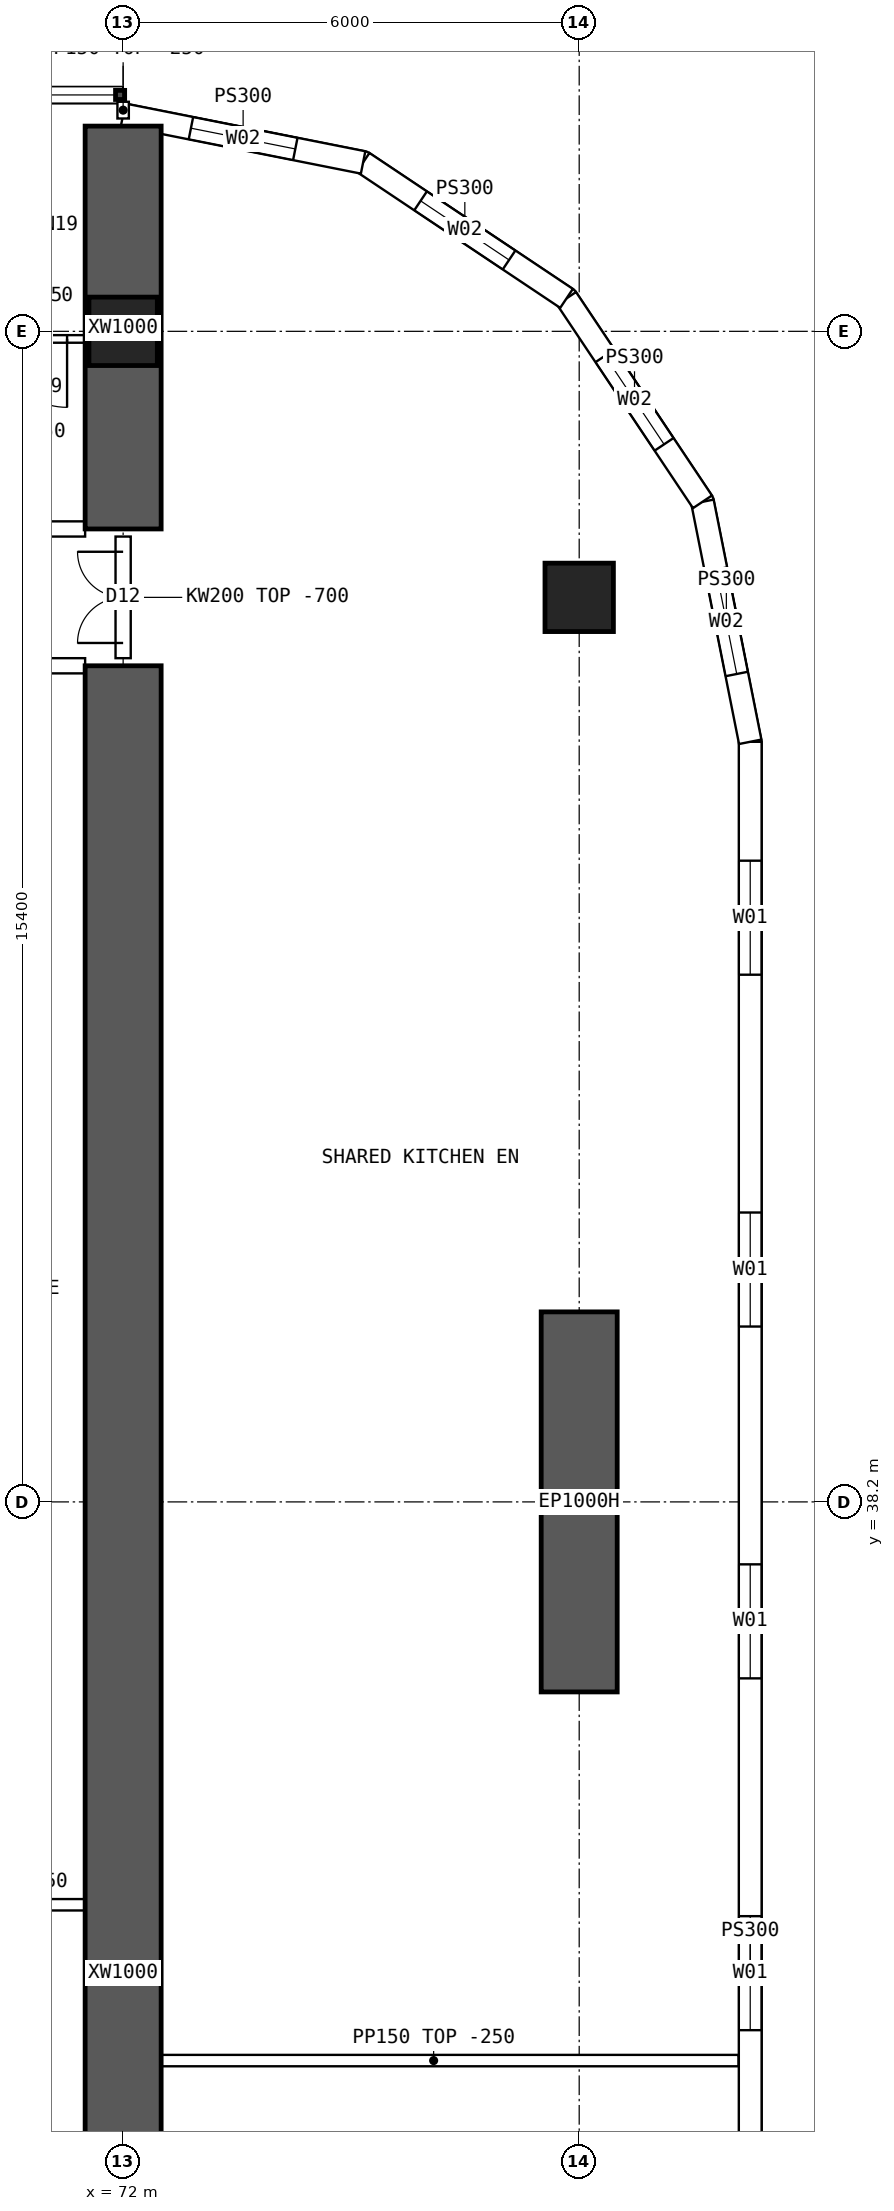
"""IFC4 building model, lengths in metres.
Left out: names, types, materials, properties, quantities, classifications, styles, units other than length and angle.
Written with IfcOpenShell. Run it as: python <this file> out.ifc"""

import sys

from ifc_helpers import new_model, si_unit, direction, frame, frame_2d, origin, origin_2d, place, context, subcontext, project, spatial, polyline, rectangle, hollow_rectangle, outline, extrude, element, fill, save


model = new_model("IFC4")
c1 = context("Model", 3, precision=1e-05, world=origin(), true_north=direction((0.0, 1.0)))
c2 = subcontext(c1, "Body", "Model", "MODEL_VIEW")
j1 = project(units=[si_unit("LENGTHUNIT", "METRE"), si_unit("PLANEANGLEUNIT", "RADIAN")], contexts=[c1])
p1 = place(None, origin())
s1 = spatial("IfcSite", under=j1, at=p1, CompositionType="ELEMENT")
p2 = place(p1, origin())
s2 = spatial("IfcBuilding", under=s1, at=p2, CompositionType="ELEMENT")
p3 = place(p2, frame((0.0, 0.0, 23.95)))
s3 = spatial("IfcBuildingStorey", under=s2, at=p3, CompositionType="ELEMENT", Elevation=23.95)
for number, where, z_axis, x_axis in (
    (1, (72.0, 53.6, 0.0), (0.0, 0.0, 1.0), (1.0, 0.0, 0.0)),
    (2, (78.0, 50.1, 0.0), (0.0, 0.0, 1.0), (1.0, 0.0, 0.0)),
):
    element("IfcColumn", number, at=place(p3, frame(where, z_axis=z_axis, x_axis=x_axis)), inside=s3, PredefinedType="COLUMN", context=c2, shape_type="SweptSolid", body=[
        extrude(hollow_rectangle(XDim=0.9, YDim=0.9, WallThickness=0.09, at=origin_2d()), origin(), (0.0, 0.0, 1.0), 3.75),
    ])
p4 = place(p3, frame((78.0, 35.7, 0.0), z_axis=(0.0, 0.0, 1.0), x_axis=(0.0, 1.0, 0.0)))
e3 = element("IfcWall", 3, at=p4, inside=s3, PredefinedType="SHEAR", context=c2, shape_type="SweptSolid", body=[
    extrude(rectangle(XDim=5.0, YDim=1.0, at=frame_2d((2.5, 0.0))), origin(), (0.0, 0.0, 1.0), 3.75),
])
p5 = place(p3, frame((72.0, 51.0, 0.0), z_axis=(0.0, 0.0, 1.0), x_axis=(0.0, 1.0, 0.0)))
e4 = element("IfcWall", 4, at=p5, inside=s3, PredefinedType="SHEAR", context=c2, shape_type="SweptSolid", body=[
    extrude(rectangle(XDim=5.3, YDim=1.0, at=frame_2d((2.65, 0.0))), origin(), (0.0, 0.0, 1.0), 3.75),
])
p6 = place(p3, frame((72.0, 14.8, 0.0), z_axis=(0.0, 0.0, 1.0), x_axis=(0.0, 1.0, 0.0)))
e5 = element("IfcWall", 5, at=p6, inside=s3, PredefinedType="SHEAR", context=c2, shape_type="SweptSolid", body=[
    extrude(rectangle(XDim=34.4, YDim=1.0, at=frame_2d((17.2, 0.0))), origin(), (0.0, 0.0, 1.0), 3.75),
])
p7 = place(p3, frame((80.25, 15.8, 0.0), z_axis=(0.0, 0.0, 1.0), x_axis=(0.0, 1.0, 0.0)))
e6 = element("IfcWall", 6, at=p7, inside=s3, PredefinedType="SOLIDWALL", context=c2, shape_type="SweptSolid", body=[
    extrude(outline(polyline([(-0.015, -0.15), (32.415, -0.15), (32.385, 0.15), (0.015, 0.15), (-0.015, -0.15)])), origin(), (0.0, 0.0, 1.0), 3.5),
])
p8 = place(p7, frame((1.564, 0.0, 0.9)))
e7 = element("IfcOpeningElement", 7, at=p8, cuts=e6, PredefinedType="OPENING", context=c2, shape_type="SweptSolid", body=[
    extrude(rectangle(XDim=1.5, YDim=2.0, at=frame_2d((0.75, 1.0))), frame((0.0, 0.16, 0.0), z_axis=(0.0, -1.0, 0.0), x_axis=(1.0, 0.0, 0.0)), (0.0, 0.0, 1.0), 0.32),
])
p9 = place(p7, frame((6.193, 0.0, 0.9)))
e8 = element("IfcOpeningElement", 8, at=p9, cuts=e6, PredefinedType="OPENING", context=c2, shape_type="SweptSolid", body=[
    extrude(rectangle(XDim=1.5, YDim=2.0, at=frame_2d((0.75, 1.0))), frame((0.0, 0.16, 0.0), z_axis=(0.0, -1.0, 0.0), x_axis=(1.0, 0.0, 0.0)), (0.0, 0.0, 1.0), 0.32),
])
p10 = place(p7, frame((10.822, 0.0, 0.9)))
e9 = element("IfcOpeningElement", 9, at=p10, cuts=e6, PredefinedType="OPENING", context=c2, shape_type="SweptSolid", body=[
    extrude(rectangle(XDim=1.5, YDim=2.0, at=frame_2d((0.75, 1.0))), frame((0.0, 0.16, 0.0), z_axis=(0.0, -1.0, 0.0), x_axis=(1.0, 0.0, 0.0)), (0.0, 0.0, 1.0), 0.32),
])
p11 = place(p7, frame((15.45, 0.0, 0.9)))
e10 = element("IfcOpeningElement", 10, at=p11, cuts=e6, PredefinedType="OPENING", context=c2, shape_type="SweptSolid", body=[
    extrude(rectangle(XDim=1.5, YDim=2.0, at=frame_2d((0.75, 1.0))), frame((0.0, 0.16, 0.0), z_axis=(0.0, -1.0, 0.0), x_axis=(1.0, 0.0, 0.0)), (0.0, 0.0, 1.0), 0.32),
])
p12 = place(p7, frame((20.079, 0.0, 0.9)))
e11 = element("IfcOpeningElement", 11, at=p12, cuts=e6, PredefinedType="OPENING", context=c2, shape_type="SweptSolid", body=[
    extrude(rectangle(XDim=1.5, YDim=2.0, at=frame_2d((0.75, 1.0))), frame((0.0, 0.16, 0.0), z_axis=(0.0, -1.0, 0.0), x_axis=(1.0, 0.0, 0.0)), (0.0, 0.0, 1.0), 0.32),
])
p13 = place(p7, frame((24.707, 0.0, 0.9)))
e12 = element("IfcOpeningElement", 12, at=p13, cuts=e6, PredefinedType="OPENING", context=c2, shape_type="SweptSolid", body=[
    extrude(rectangle(XDim=1.5, YDim=2.0, at=frame_2d((0.75, 1.0))), frame((0.0, 0.16, 0.0), z_axis=(0.0, -1.0, 0.0), x_axis=(1.0, 0.0, 0.0)), (0.0, 0.0, 1.0), 0.32),
])
p14 = place(p7, frame((29.336, 0.0, 0.9)))
e13 = element("IfcOpeningElement", 13, at=p14, cuts=e6, PredefinedType="OPENING", context=c2, shape_type="SweptSolid", body=[
    extrude(rectangle(XDim=1.5, YDim=2.0, at=frame_2d((0.75, 1.0))), frame((0.0, 0.16, 0.0), z_axis=(0.0, -1.0, 0.0), x_axis=(1.0, 0.0, 0.0)), (0.0, 0.0, 1.0), 0.32),
])
p15 = place(p3, frame((80.25, 48.2, 0.0), z_axis=(0.0, 0.0, 1.0), x_axis=(-0.195065901187, 0.980790137692, 0.0)))
e14 = element("IfcWall", 14, at=p15, inside=s3, PredefinedType="SOLIDWALL", context=c2, shape_type="SweptSolid", body=[
    extrude(outline(polyline([(-0.015, -0.15), (3.249, -0.15), (3.189, 0.15), (0.015, 0.15), (-0.015, -0.15)])), origin(), (0.0, 0.0, 1.0), 3.5),
])
p16 = place(p15, frame((0.909, 0.0, 0.9)))
e15 = element("IfcOpeningElement", 15, at=p16, cuts=e14, PredefinedType="OPENING", context=c2, shape_type="SweptSolid", body=[
    extrude(rectangle(XDim=1.4, YDim=1.8, at=frame_2d((0.7, 0.9))), frame((0.0, 0.16, 0.0), z_axis=(0.0, -1.0, 0.0), x_axis=(1.0, 0.0, 0.0)), (0.0, 0.0, 1.0), 0.32),
])
p17 = place(p3, frame((79.622, 51.357, 0.0), z_axis=(0.0, 0.0, 1.0), x_axis=(-0.555609954424, 0.831443069936, 0.0)))
e16 = element("IfcWall", 16, at=p17, inside=s3, PredefinedType="SOLIDWALL", context=c2, shape_type="SweptSolid", body=[
    extrude(outline(polyline([(-0.03, -0.15), (3.249, -0.15), (3.189, 0.15), (0.03, 0.15), (-0.03, -0.15)])), origin(), (0.0, 0.0, 1.0), 3.5),
])
p18 = place(p17, frame((0.909, 0.0, 0.9)))
e17 = element("IfcOpeningElement", 17, at=p18, cuts=e16, PredefinedType="OPENING", context=c2, shape_type="SweptSolid", body=[
    extrude(rectangle(XDim=1.4, YDim=1.8, at=frame_2d((0.7, 0.9))), frame((0.0, 0.16, 0.0), z_axis=(0.0, -1.0, 0.0), x_axis=(1.0, 0.0, 0.0)), (0.0, 0.0, 1.0), 0.32),
])
p19 = place(p3, frame((77.833, 54.034, 0.0), z_axis=(0.0, 0.0, 1.0), x_axis=(-0.831478105043, 0.555557522525, 0.0)))
e18 = element("IfcWall", 18, at=p19, inside=s3, PredefinedType="SOLIDWALL", context=c2, shape_type="SweptSolid", body=[
    extrude(outline(polyline([(-0.03, -0.15), (3.249, -0.15), (3.189, 0.15), (0.03, 0.15), (-0.03, -0.15)])), origin(), (0.0, 0.0, 1.0), 3.5),
])
p20 = place(p19, frame((0.909, 0.0, 0.9)))
e19 = element("IfcOpeningElement", 19, at=p20, cuts=e18, PredefinedType="OPENING", context=c2, shape_type="SweptSolid", body=[
    extrude(rectangle(XDim=1.4, YDim=1.8, at=frame_2d((0.7, 0.9))), frame((0.0, 0.16, 0.0), z_axis=(0.0, -1.0, 0.0), x_axis=(1.0, 0.0, 0.0)), (0.0, 0.0, 1.0), 0.32),
])
p21 = place(p3, frame((75.157, 55.822, 0.0), z_axis=(0.0, 0.0, 1.0), x_axis=(-0.980787251524, 0.195080412259, 0.0)))
e20 = element("IfcWall", 20, at=p21, inside=s3, PredefinedType="SOLIDWALL", context=c2, shape_type="SweptSolid", body=[
    extrude(outline(polyline([(-0.03, -0.15), (3.249, -0.15), (3.189, 0.15), (0.03, 0.15), (-0.03, -0.15)])), origin(), (0.0, 0.0, 1.0), 3.5),
])
p22 = place(p21, frame((0.909, 0.0, 0.9)))
e21 = element("IfcOpeningElement", 21, at=p22, cuts=e20, PredefinedType="OPENING", context=c2, shape_type="SweptSolid", body=[
    extrude(rectangle(XDim=1.4, YDim=1.8, at=frame_2d((0.7, 0.9))), frame((0.0, 0.16, 0.0), z_axis=(0.0, -1.0, 0.0), x_axis=(1.0, 0.0, 0.0)), (0.0, 0.0, 1.0), 0.32),
])
p23 = place(p3, frame((66.5, 51.0, 0.0), z_axis=(0.0, 0.0, 1.0), x_axis=(1.0, 0.0, 0.0)))
e22 = element("IfcWall", 22, at=p23, inside=s3, PredefinedType="SOLIDWALL", context=c2, shape_type="SweptSolid", body=[
    extrude(outline(polyline([(0.0, 0.0), (5.0, 0.0), (5.0, 3.1), (0.0, 3.1), (0.0, 0.0)])), frame((0.0, 0.1, 0.0), z_axis=(0.0, -1.0, 0.0), x_axis=(1.0, 0.0, 0.0)), (0.0, 0.0, 1.0), 0.2),
])
p24 = place(p23, frame((1.425, 0.0, 0.0)))
e23 = element("IfcOpeningElement", 23, at=p24, cuts=e22, PredefinedType="OPENING", context=c2, shape_type="SweptSolid", body=[
    extrude(rectangle(XDim=0.9, YDim=2.1, at=frame_2d((0.45, 1.05))), frame((0.0, 0.11, 0.0), z_axis=(0.0, -1.0, 0.0), x_axis=(1.0, 0.0, 0.0)), (0.0, 0.0, 1.0), 0.22),
])
p25 = place(p23, frame((2.675, 0.0, 0.0)))
e24 = element("IfcOpeningElement", 24, at=p25, cuts=e22, PredefinedType="OPENING", context=c2, shape_type="SweptSolid", body=[
    extrude(rectangle(XDim=0.9, YDim=2.1, at=frame_2d((0.45, 1.05))), frame((0.0, 0.11, 0.0), z_axis=(0.0, -1.0, 0.0), x_axis=(1.0, 0.0, 0.0)), (0.0, 0.0, 1.0), 0.22),
])
p26 = place(p3, frame((66.5, 49.2, 0.0), z_axis=(0.0, 0.0, 1.0), x_axis=(1.0, 0.0, 0.0)))
e25 = element("IfcWall", 25, at=p26, inside=s3, PredefinedType="SOLIDWALL", context=c2, shape_type="SweptSolid", body=[
    extrude(rectangle(XDim=5.0, YDim=0.2, at=frame_2d((2.5, 0.0))), origin(), (0.0, 0.0, 1.0), 3.5),
])
p27 = place(p26, frame((0.2, 0.0, 0.0)))
e26 = element("IfcOpeningElement", 26, at=p27, cuts=e25, PredefinedType="OPENING", context=c2, shape_type="SweptSolid", body=[
    extrude(rectangle(XDim=1.6, YDim=2.1, at=frame_2d((0.8, 1.05))), frame((0.0, 0.11, 0.0), z_axis=(0.0, -1.0, 0.0), x_axis=(1.0, 0.0, 0.0)), (0.0, 0.0, 1.0), 0.22),
])
p28 = place(p3, frame((70.125, 53.5, 0.0), z_axis=(0.0, 0.0, 1.0), x_axis=(1.0, 0.0, 0.0)))
e27 = element("IfcWall", 27, at=p28, inside=s3, PredefinedType="PARTITIONING", context=c2, shape_type="SweptSolid", body=[
    extrude(outline(polyline([(0.0, 0.0), (1.425, 0.0), (1.425, 3.1), (0.0, 3.1), (0.0, 0.0)])), frame((0.0, 0.05, 0.0), z_axis=(0.0, -1.0, 0.0), x_axis=(1.0, 0.0, 0.0)), (0.0, 0.0, 1.0), 0.1),
])
p29 = place(p28, frame((0.238, 0.0, 0.0)))
e28 = element("IfcOpeningElement", 28, at=p29, cuts=e27, PredefinedType="OPENING", context=c2, shape_type="SweptSolid", body=[
    extrude(rectangle(XDim=0.9, YDim=2.1, at=frame_2d((0.45, 1.05))), frame((0.0, 0.06, 0.0), z_axis=(0.0, -1.0, 0.0), x_axis=(1.0, 0.0, 0.0)), (0.0, 0.0, 1.0), 0.12),
])
p30 = place(p3, frame((68.4, 32.9, 0.0), z_axis=(0.0, 0.0, 1.0), x_axis=(1.0, 0.0, 0.0)))
e29 = element("IfcWall", 29, at=p30, inside=s3, PredefinedType="PARTITIONING", context=c2, shape_type="SweptSolid", body=[
    extrude(rectangle(XDim=3.6, YDim=0.15, at=frame_2d((1.8, 0.0))), origin(), (0.0, 0.0, 1.0), 3.5),
])
p31 = place(p3, frame((72.075, 30.85, 0.0), z_axis=(0.0, 0.0, 1.0), x_axis=(1.0, 0.0, 0.0)))
e30 = element("IfcWall", 30, at=p31, inside=s3, PredefinedType="PARTITIONING", context=c2, shape_type="SweptSolid", body=[
    extrude(outline(polyline([(0.0, 0.0), (8.02, 0.0), (8.02, 3.5), (6.227, 3.5), (6.225, 3.05), (5.627, 3.05), (5.625, 3.5), (0.0, 3.5), (0.0, 0.0)])), frame((0.0, 0.075, 0.0), z_axis=(0.0, -1.0, 0.0), x_axis=(1.0, 0.0, 0.0)), (0.0, 0.0, 1.0), 0.15),
])
p32 = place(p3, frame((72.0, 49.3, 0.0), z_axis=(0.0, 0.0, 1.0), x_axis=(0.0, 1.0, 0.0)))
e31 = element("IfcWall", 31, at=p32, inside=s3, PredefinedType="SOLIDWALL", context=c2, shape_type="SweptSolid", body=[
    extrude(outline(polyline([(0.0, 0.0), (1.6, 0.0), (1.6, 3.05), (0.0, 3.05), (0.0, 0.0)])), frame((0.0, 0.1, 0.0), z_axis=(0.0, -1.0, 0.0), x_axis=(1.0, 0.0, 0.0)), (0.0, 0.0, 1.0), 0.2),
])
p33 = place(p32, frame((0.2, 0.0, 0.0)))
e32 = element("IfcOpeningElement", 32, at=p33, cuts=e31, PredefinedType="OPENING", context=c2, shape_type="SweptSolid", body=[
    extrude(rectangle(XDim=1.2, YDim=2.1, at=frame_2d((0.6, 1.05))), frame((0.0, 0.11, 0.0), z_axis=(0.0, -1.0, 0.0), x_axis=(1.0, 0.0, 0.0)), (0.0, 0.0, 1.0), 0.22),
])
p34 = place(p3, frame((72.0, 56.4, 0.0), z_axis=(0.0, 0.0, 1.0), x_axis=(0.0, 1.0, 0.0)))
e33 = element("IfcWall", 33, at=p34, inside=s3, PredefinedType="PARTITIONING", context=c2, shape_type="SweptSolid", body=[
    extrude(rectangle(XDim=0.22, YDim=0.15, at=frame_2d((0.11, 0.0))), origin(), (0.0, 0.0, 1.0), 3.5),
])
p35 = place(p11, origin())
e34 = element("IfcWindow", 34, at=p35, inside=s3, PartitioningType="SINGLE_PANEL", PredefinedType="WINDOW", context=c2, shape_type="SweptSolid", body=[
    extrude(rectangle(XDim=1.5, YDim=2.0, at=frame_2d((0.75, 1.0))), frame((0.0, 0.03, 0.0), z_axis=(0.0, -1.0, 0.0), x_axis=(1.0, 0.0, 0.0)), (0.0, 0.0, 1.0), 0.06),
])
fill(e10, e34)
p36 = place(p12, origin())
e35 = element("IfcWindow", 35, at=p36, inside=s3, PartitioningType="SINGLE_PANEL", PredefinedType="WINDOW", context=c2, shape_type="SweptSolid", body=[
    extrude(rectangle(XDim=1.5, YDim=2.0, at=frame_2d((0.75, 1.0))), frame((0.0, 0.03, 0.0), z_axis=(0.0, -1.0, 0.0), x_axis=(1.0, 0.0, 0.0)), (0.0, 0.0, 1.0), 0.06),
])
fill(e11, e35)
p37 = place(p13, origin())
e36 = element("IfcWindow", 36, at=p37, inside=s3, PartitioningType="SINGLE_PANEL", PredefinedType="WINDOW", context=c2, shape_type="SweptSolid", body=[
    extrude(rectangle(XDim=1.5, YDim=2.0, at=frame_2d((0.75, 1.0))), frame((0.0, 0.03, 0.0), z_axis=(0.0, -1.0, 0.0), x_axis=(1.0, 0.0, 0.0)), (0.0, 0.0, 1.0), 0.06),
])
fill(e12, e36)
p38 = place(p14, origin())
e37 = element("IfcWindow", 37, at=p38, inside=s3, PartitioningType="SINGLE_PANEL", PredefinedType="WINDOW", context=c2, shape_type="SweptSolid", body=[
    extrude(rectangle(XDim=1.5, YDim=2.0, at=frame_2d((0.75, 1.0))), frame((0.0, 0.03, 0.0), z_axis=(0.0, -1.0, 0.0), x_axis=(1.0, 0.0, 0.0)), (0.0, 0.0, 1.0), 0.06),
])
fill(e13, e37)
p39 = place(p16, origin())
e38 = element("IfcWindow", 38, at=p39, inside=s3, PartitioningType="SINGLE_PANEL", PredefinedType="WINDOW", context=c2, shape_type="SweptSolid", body=[
    extrude(rectangle(XDim=1.4, YDim=1.8, at=frame_2d((0.7, 0.9))), frame((0.0, 0.03, 0.0), z_axis=(0.0, -1.0, 0.0), x_axis=(1.0, 0.0, 0.0)), (0.0, 0.0, 1.0), 0.06),
])
fill(e15, e38)
p40 = place(p18, origin())
e39 = element("IfcWindow", 39, at=p40, inside=s3, PartitioningType="SINGLE_PANEL", PredefinedType="WINDOW", context=c2, shape_type="SweptSolid", body=[
    extrude(rectangle(XDim=1.4, YDim=1.8, at=frame_2d((0.7, 0.9))), frame((0.0, 0.03, 0.0), z_axis=(0.0, -1.0, 0.0), x_axis=(1.0, 0.0, 0.0)), (0.0, 0.0, 1.0), 0.06),
])
fill(e17, e39)
p41 = place(p20, origin())
e40 = element("IfcWindow", 40, at=p41, inside=s3, PartitioningType="SINGLE_PANEL", PredefinedType="WINDOW", context=c2, shape_type="SweptSolid", body=[
    extrude(rectangle(XDim=1.4, YDim=1.8, at=frame_2d((0.7, 0.9))), frame((0.0, 0.03, 0.0), z_axis=(0.0, -1.0, 0.0), x_axis=(1.0, 0.0, 0.0)), (0.0, 0.0, 1.0), 0.06),
])
fill(e19, e40)
p42 = place(p22, origin())
e41 = element("IfcWindow", 41, at=p42, inside=s3, PartitioningType="SINGLE_PANEL", PredefinedType="WINDOW", context=c2, shape_type="SweptSolid", body=[
    extrude(rectangle(XDim=1.4, YDim=1.8, at=frame_2d((0.7, 0.9))), frame((0.0, 0.03, 0.0), z_axis=(0.0, -1.0, 0.0), x_axis=(1.0, 0.0, 0.0)), (0.0, 0.0, 1.0), 0.06),
])
fill(e21, e41)
p43 = place(p29, origin())
e42 = element("IfcDoor", 42, at=p43, inside=s3, OperationType="SINGLE_SWING_RIGHT", PredefinedType="DOOR", context=c2, shape_type="SweptSolid", body=[
    extrude(rectangle(XDim=0.9, YDim=2.1, at=frame_2d((0.45, 1.05))), frame((0.0, 0.025, 0.0), z_axis=(0.0, -1.0, 0.0), x_axis=(1.0, 0.0, 0.0)), (0.0, 0.0, 1.0), 0.05),
])
fill(e28, e42)
p44 = place(p33, origin())
e43 = element("IfcDoor", 43, at=p44, inside=s3, OperationType="DOUBLE_DOOR_SINGLE_SWING", PredefinedType="DOOR", context=c2, shape_type="SweptSolid", body=[
    extrude(rectangle(XDim=1.2, YDim=2.1, at=frame_2d((0.6, 1.05))), frame((0.0, 0.025, 0.0), z_axis=(0.0, -1.0, 0.0), x_axis=(1.0, 0.0, 0.0)), (0.0, 0.0, 1.0), 0.05),
])
fill(e32, e43)
save(model, sys.argv[1])
